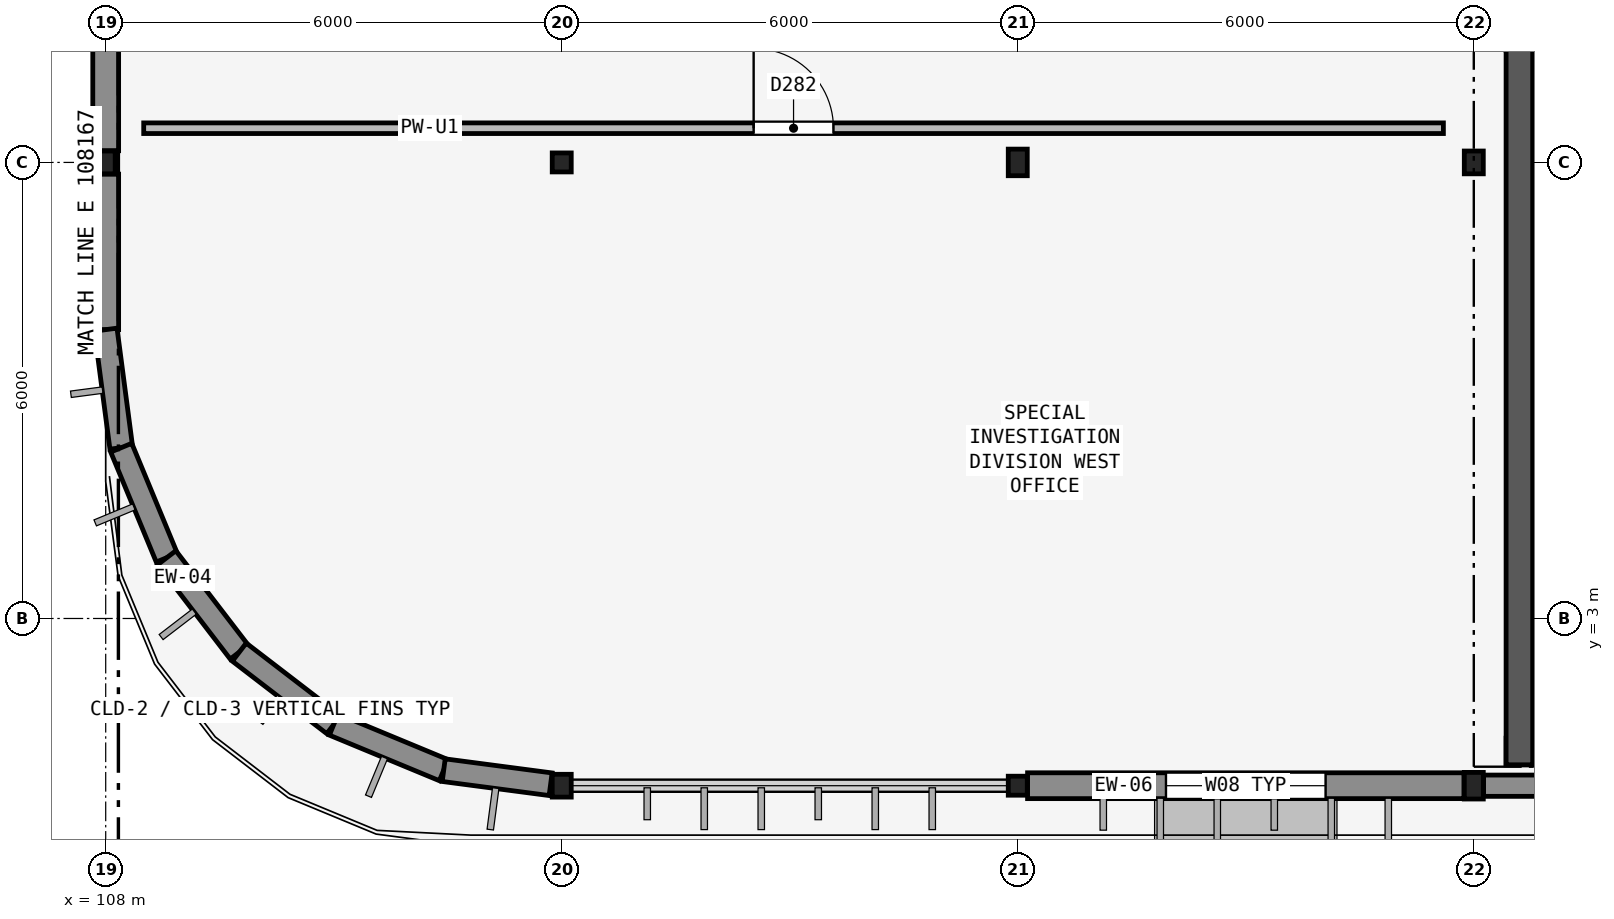
"""IFC4 building model, lengths in metres.
Left out: names, types, materials, properties, quantities, classifications, styles, units other than length and angle.
Written with IfcOpenShell. Run it as: python <this file> out.ifc"""

import sys

from ifc_helpers import new_model, si_unit, direction, frame, frame_2d, origin, origin_2d, place, context, subcontext, project, spatial, rectangle, hollow_rectangle, i_section, extrude, element, fill, save


model = new_model("IFC4")
c1 = context("Model", 3, precision=1e-05, world=origin(), true_north=direction((0.0, 1.0)))
c2 = subcontext(c1, "Body", "Model", "MODEL_VIEW")
j1 = project(units=[si_unit("LENGTHUNIT", "METRE"), si_unit("PLANEANGLEUNIT", "RADIAN")], contexts=[c1])
p1 = place(None, origin())
s1 = spatial("IfcSite", under=j1, at=p1, CompositionType="ELEMENT")
p2 = place(p1, origin())
s2 = spatial("IfcBuilding", under=s1, at=p2, CompositionType="ELEMENT")
p3 = place(p2, frame((0.0, 0.0, 22.2)))
s3 = spatial("IfcBuildingStorey", under=s2, at=p3, CompositionType="ELEMENT", Elevation=22.2)
for number, where, z_axis, x_axis in (
    (1, (108.0, 9.0, 0.0), (0.0, 0.0, 1.0), (1.0, 0.0, 0.0)),
    (2, (114.0, 0.8, 0.0), (0.0, 0.0, 1.0), (1.0, 0.0, 0.0)),
):
    element("IfcColumn", number, at=place(p3, frame(where, z_axis=z_axis, x_axis=x_axis)), inside=s3, PredefinedType="COLUMN", context=c2, shape_type="SweptSolid", body=[
        extrude(i_section(OverallWidth=0.25, OverallDepth=0.3, WebThickness=0.01, FlangeThickness=0.01, FilletRadius=0.012, at=origin_2d()), origin(), (0.0, 0.0, 1.0), 3.9),
    ])
for number, where, z_axis, x_axis in (
    (3, (114.0, 9.0, 0.0), (0.0, 0.0, 1.0), (1.0, 0.0, 0.0)),
    (4, (120.0, 0.8, 0.0), (0.0, 0.0, 1.0), (1.0, 0.0, 0.0)),
):
    element("IfcColumn", number, at=place(p3, frame(where, z_axis=z_axis, x_axis=x_axis)), inside=s3, PredefinedType="COLUMN", context=c2, shape_type="SweptSolid", body=[
        extrude(hollow_rectangle(XDim=0.25, YDim=0.25, WallThickness=0.012, InnerFilletRadius=0.012, OuterFilletRadius=0.024, at=origin_2d()), origin(), (0.0, 0.0, 1.0), 3.9),
    ])
for number, where, z_axis, x_axis in (
    (5, (120.0, 9.0, 0.0), (0.0, 0.0, 1.0), (1.0, 0.0, 0.0)),
    (6, (126.0, 0.8, 0.0), (0.0, 0.0, 1.0), (1.0, 0.0, 0.0)),
):
    element("IfcColumn", number, at=place(p3, frame(where, z_axis=z_axis, x_axis=x_axis)), inside=s3, PredefinedType="COLUMN", context=c2, shape_type="SweptSolid", body=[
        extrude(i_section(OverallWidth=0.25, OverallDepth=0.35, WebThickness=0.01, FlangeThickness=0.012, FilletRadius=0.012, at=origin_2d()), origin(), (0.0, 0.0, 1.0), 3.9),
    ])
p4 = place(p3, frame((126.0, 9.0, 0.0), z_axis=(0.0, 0.0, 1.0), x_axis=(1.0, 0.0, 0.0)))
e7 = element("IfcColumn", 7, at=p4, inside=s3, PredefinedType="COLUMN", context=c2, shape_type="SweptSolid", body=[
    extrude(i_section(OverallWidth=0.25, OverallDepth=0.3, WebThickness=0.01, FlangeThickness=0.01, FilletRadius=0.012, at=origin_2d()), origin(), (0.0, 0.0, 1.0), 3.9),
])
p5 = place(p3, frame((120.129, 0.8, 0.0), z_axis=(0.0, 0.0, 1.0), x_axis=(1.0, 0.0, 0.0)))
e8 = element("IfcWall", 8, at=p5, inside=s3, PredefinedType="SOLIDWALL", context=c2, shape_type="SweptSolid", body=[
    extrude(rectangle(XDim=5.742, YDim=0.34, at=frame_2d((2.871, 0.0))), origin(), (0.0, 0.0, 1.0), 3.23),
])
p6 = place(p5, frame((1.821, 0.0, 0.9)))
e9 = element("IfcOpeningElement", 9, at=p6, cuts=e8, PredefinedType="OPENING", context=c2, shape_type="SweptSolid", body=[
    extrude(rectangle(XDim=2.1, YDim=1.5, at=frame_2d((1.05, 0.75))), frame((0.0, 0.18, 0.0), z_axis=(0.0, -1.0, 0.0), x_axis=(1.0, 0.0, 0.0)), (0.0, 0.0, 1.0), 0.36),
])
p7 = place(p3, frame((126.129, 0.8, 0.0), z_axis=(0.0, 0.0, 1.0), x_axis=(1.0, 0.0, 0.0)))
e10 = element("IfcWall", 10, at=p7, inside=s3, PredefinedType="SOLIDWALL", context=c2, shape_type="SweptSolid", body=[
    extrude(rectangle(XDim=5.742, YDim=0.28, at=frame_2d((2.871, 0.0))), origin(), (0.0, 0.0, 1.0), 3.23),
])
p8 = place(p3, frame((108.0, 6.8, 0.0), z_axis=(0.0, 0.0, 1.0), x_axis=(0.0, 1.0, 0.0)))
e11 = element("IfcWall", 11, at=p8, inside=s3, PredefinedType="SOLIDWALL", context=c2, shape_type="SweptSolid", body=[
    extrude(rectangle(XDim=2.046, YDim=0.34, at=frame_2d((1.023, 0.0))), origin(), (0.0, 0.0, 1.0), 3.08),
])
p9 = place(p3, frame((108.0, 9.154, 0.0), z_axis=(0.0, 0.0, 1.0), x_axis=(0.0, 1.0, 0.0)))
e12 = element("IfcWall", 12, at=p9, inside=s3, PredefinedType="SOLIDWALL", context=c2, shape_type="SweptSolid", body=[
    extrude(rectangle(XDim=5.717, YDim=0.34, at=frame_2d((2.858, 0.0))), origin(), (0.0, 0.0, 1.0), 3.08),
])
p10 = place(p9, frame((1.809, 0.0, 0.9)))
e13 = element("IfcOpeningElement", 13, at=p10, cuts=e12, PredefinedType="OPENING", context=c2, shape_type="SweptSolid", body=[
    extrude(rectangle(XDim=2.1, YDim=1.5, at=frame_2d((1.05, 0.75))), frame((0.0, 0.18, 0.0), z_axis=(0.0, -1.0, 0.0), x_axis=(1.0, 0.0, 0.0)), (0.0, 0.0, 1.0), 0.36),
])
p11 = place(p3, frame((108.0, 6.8, 0.0), z_axis=(0.0, 0.0, 1.0), x_axis=(0.130458544462, -0.991453765022, 0.0)))
e14 = element("IfcWall", 14, at=p11, inside=s3, PredefinedType="SOLIDWALL", context=c2, shape_type="SweptSolid", body=[
    extrude(rectangle(XDim=1.566, YDim=0.3, at=frame_2d((0.783, 0.0))), origin(), (0.0, 0.0, 1.0), 3.685),
])
p12 = place(p3, frame((108.204, 5.247, 0.0), z_axis=(0.0, 0.0, 1.0), x_axis=(0.382677606907, -0.923881945474, 0.0)))
e15 = element("IfcWall", 15, at=p12, inside=s3, PredefinedType="SOLIDWALL", context=c2, shape_type="SweptSolid", body=[
    extrude(rectangle(XDim=1.566, YDim=0.3, at=frame_2d((0.783, 0.0))), origin(), (0.0, 0.0, 1.0), 3.685),
])
for number, where, z_axis, x_axis in (
    (16, (108.804, 3.8, 0.0), (0.0, 0.0, 1.0), (0.609, -0.793, 0.0)),
    (17, (109.757, 2.557, 0.0), (0.0, 0.0, 1.0), (0.793, -0.609, 0.0)),
):
    element("IfcWall", number, at=place(p3, frame(where, z_axis=z_axis, x_axis=x_axis)), inside=s3, PredefinedType="SOLIDWALL", context=c2, shape_type="SweptSolid", body=[
        extrude(rectangle(XDim=1.566, YDim=0.3, at=frame_2d((0.783, 0.0))), origin(), (0.0, 0.0, 1.0), 3.685),
    ])
p13 = place(p3, frame((111.0, 1.604, 0.0), z_axis=(0.0, 0.0, 1.0), x_axis=(0.923881945474, -0.382677606907, 0.0)))
e18 = element("IfcWall", 18, at=p13, inside=s3, PredefinedType="SOLIDWALL", context=c2, shape_type="SweptSolid", body=[
    extrude(rectangle(XDim=1.566, YDim=0.3, at=frame_2d((0.783, 0.0))), origin(), (0.0, 0.0, 1.0), 3.685),
])
p14 = place(p3, frame((112.447, 1.004, 0.0), z_axis=(0.0, 0.0, 1.0), x_axis=(0.991435544456, -0.130596941729, 0.0)))
e19 = element("IfcWall", 19, at=p14, inside=s3, PredefinedType="SOLIDWALL", context=c2, shape_type="SweptSolid", body=[
    extrude(rectangle(XDim=1.419, YDim=0.3, at=frame_2d((0.709, 0.0))), origin(), (0.0, 0.0, 1.0), 3.23),
])
p15 = place(p3, frame((126.425, 1.25, 0.0), z_axis=(0.0, 0.0, 1.0), x_axis=(1.0, 0.0, 0.0)))
e20 = element("IfcWall", 20, at=p15, inside=s3, PredefinedType="SHEAR", context=c2, shape_type="SweptSolid", body=[
    extrude(rectangle(XDim=5.15, YDim=0.35, at=frame_2d((2.575, 0.0))), origin(), (0.0, 0.0, 1.0), 3.76),
])
p16 = place(p3, frame((126.6, 10.825, 0.0), z_axis=(0.0, 0.0, 1.0), x_axis=(0.0, -1.0, 0.0)))
e21 = element("IfcWall", 21, at=p16, inside=s3, PredefinedType="SHEAR", context=c2, shape_type="SweptSolid", body=[
    extrude(rectangle(XDim=9.75, YDim=0.35, at=frame_2d((4.875, 0.0))), origin(), (0.0, 0.0, 1.0), 3.76),
])
p17 = place(p3, frame((108.5, 9.45, 0.0), z_axis=(0.0, 0.0, 1.0), x_axis=(1.0, 0.0, 0.0)))
e22 = element("IfcWall", 22, at=p17, inside=s3, PredefinedType="PARTITIONING", context=c2, shape_type="SweptSolid", body=[
    extrude(rectangle(XDim=17.1, YDim=0.14, at=frame_2d((8.55, 0.0))), origin(), (0.0, 0.0, 1.0), 3.28),
])
p18 = place(p17, frame((8.025, 0.0, 0.0)))
e23 = element("IfcOpeningElement", 23, at=p18, cuts=e22, PredefinedType="OPENING", context=c2, shape_type="SweptSolid", body=[
    extrude(rectangle(XDim=1.05, YDim=2.2, at=frame_2d((0.525, 1.1))), frame((0.0, 0.08, 0.0), z_axis=(0.0, -1.0, 0.0), x_axis=(1.0, 0.0, 0.0)), (0.0, 0.0, 1.0), 0.16),
])
p19 = place(p6, origin())
e24 = element("IfcWindow", 24, at=p19, inside=s3, PartitioningType="SINGLE_PANEL", PredefinedType="WINDOW", context=c2, shape_type="SweptSolid", body=[
    extrude(rectangle(XDim=2.1, YDim=1.5, at=frame_2d((1.05, 0.75))), frame((0.0, 0.03, 0.0), z_axis=(0.0, -1.0, 0.0), x_axis=(1.0, 0.0, 0.0)), (0.0, 0.0, 1.0), 0.06),
])
fill(e9, e24)
p20 = place(p18, origin())
e25 = element("IfcDoor", 25, at=p20, inside=s3, OperationType="SINGLE_SWING_LEFT", PredefinedType="DOOR", context=c2, shape_type="SweptSolid", body=[
    extrude(rectangle(XDim=1.05, YDim=2.2, at=frame_2d((0.525, 1.1))), frame((0.0, 0.025, 0.0), z_axis=(0.0, -1.0, 0.0), x_axis=(1.0, 0.0, 0.0)), (0.0, 0.0, 1.0), 0.05),
])
fill(e23, e25)
save(model, sys.argv[1])
